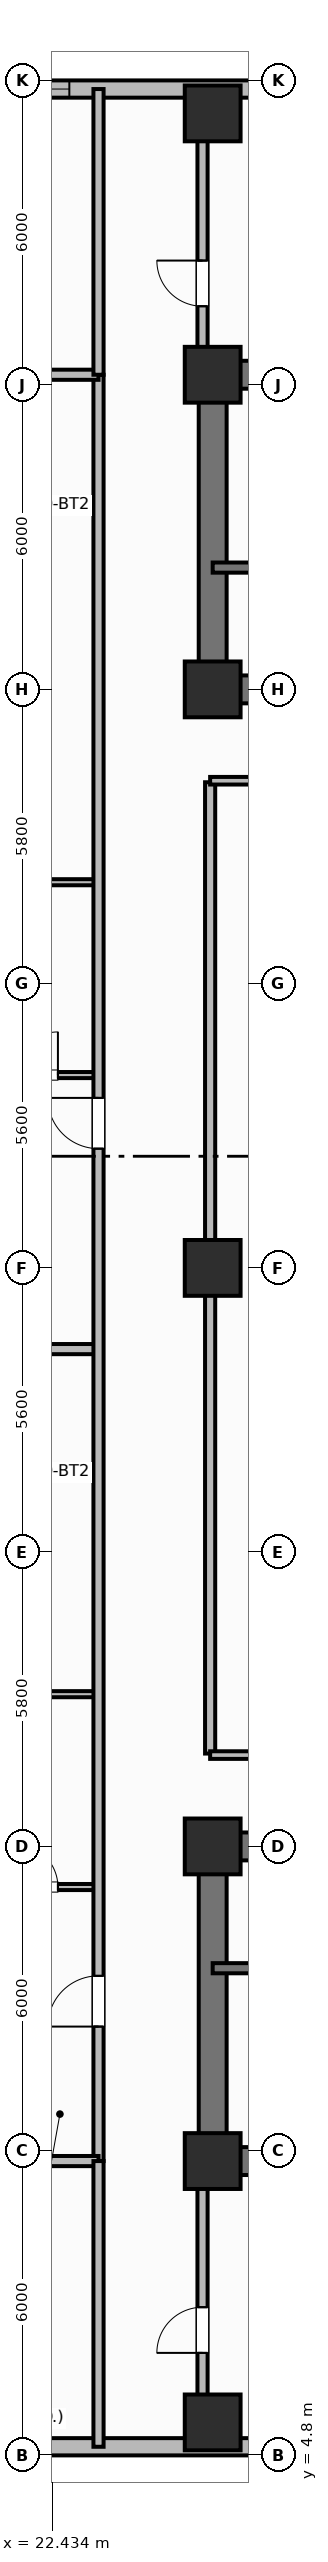
"""IFC4 building model, lengths in metres.
Left out: names, types, materials, properties, quantities, classifications, styles, units other than length and angle.
Written with IfcOpenShell. Run it as: python <this file> out.ifc"""

import sys

from ifc_helpers import new_model, si_unit, direction, frame, frame_2d, origin, origin_2d, place, context, subcontext, project, spatial, rectangle, extrude, element, fill, save


model = new_model("IFC4")
c1 = context("Model", 3, precision=1e-05, world=origin(), true_north=direction((0.0, 1.0)))
c2 = subcontext(c1, "Body", "Model", "MODEL_VIEW")
j1 = project(units=[si_unit("LENGTHUNIT", "METRE"), si_unit("PLANEANGLEUNIT", "RADIAN")], contexts=[c1])
p1 = place(None, origin())
s1 = spatial("IfcSite", under=j1, at=p1, CompositionType="ELEMENT")
p2 = place(p1, origin())
s2 = spatial("IfcBuilding", under=s1, at=p2, CompositionType="ELEMENT")
p3 = place(p2, frame((0.0, 0.0, 121.6)))
s3 = spatial("IfcBuildingStorey", under=s2, at=p3, CompositionType="ELEMENT", Elevation=121.6)
p4 = place(p3, frame((52.8, 10.6, 0.0), z_axis=(0.0, 0.0, 1.0), x_axis=(-1.0, 0.0, 0.0)))
e1 = element("IfcWall", 1, at=p4, inside=s3, PredefinedType="SHEAR", context=c2, shape_type="SweptSolid", body=[
    extrude(rectangle(XDim=27.2, YDim=0.55, at=frame_2d((13.6, 0.0))), origin(), (0.0, 0.0, 1.0), 3.7),
])
p5 = place(p3, frame((25.6, 10.875, 0.0), z_axis=(0.0, 0.0, 1.0), x_axis=(0.0, 1.0, 0.0)))
e2 = element("IfcWall", 2, at=p5, inside=s3, PredefinedType="SHEAR", context=c2, shape_type="SweptSolid", body=[
    extrude(rectangle(XDim=5.65, YDim=0.55, at=frame_2d((2.825, 0.0))), origin(), (0.0, 0.0, 1.0), 3.7),
])
p6 = place(p3, frame((25.6, 16.8, 0.0), z_axis=(0.0, 0.0, 1.0), x_axis=(1.0, 0.0, 0.0)))
e3 = element("IfcWall", 3, at=p6, inside=s3, PredefinedType="SHEAR", context=c2, shape_type="SweptSolid", body=[
    extrude(rectangle(XDim=27.2, YDim=0.55, at=frame_2d((13.6, 0.0))), origin(), (0.0, 0.0, 1.0), 3.7),
])
p7 = place(p6, frame((1.9, 0.0, 0.0)))
e4 = element("IfcOpeningElement", 4, at=p7, cuts=e3, PredefinedType="OPENING", context=c2, shape_type="SweptSolid", body=[
    extrude(rectangle(XDim=1.1, YDim=2.15, at=frame_2d((0.55, 1.075))), frame((0.0, 0.285, 0.0), z_axis=(0.0, -1.0, 0.0), x_axis=(1.0, 0.0, 0.0)), (0.0, 0.0, 1.0), 0.57),
])
p8 = place(p6, frame((13.0, 0.0, 0.0)))
e5 = element("IfcOpeningElement", 5, at=p8, cuts=e3, PredefinedType="OPENING", context=c2, shape_type="SweptSolid", body=[
    extrude(rectangle(XDim=1.2, YDim=2.15, at=frame_2d((0.6, 1.075))), frame((0.0, 0.285, 0.0), z_axis=(0.0, -1.0, 0.0), x_axis=(1.0, 0.0, 0.0)), (0.0, 0.0, 1.0), 0.57),
])
p9 = place(p6, frame((21.6, 0.0, 0.0)))
e6 = element("IfcOpeningElement", 6, at=p9, cuts=e3, PredefinedType="OPENING", context=c2, shape_type="SweptSolid", body=[
    extrude(rectangle(XDim=1.0, YDim=2.15, at=frame_2d((0.5, 1.075))), frame((0.0, 0.285, 0.0), z_axis=(0.0, -1.0, 0.0), x_axis=(1.0, 0.0, 0.0)), (0.0, 0.0, 1.0), 0.57),
])
p10 = place(p3, frame((25.6, 45.8, 0.0), z_axis=(0.0, 0.0, 1.0), x_axis=(1.0, 0.0, 0.0)))
e7 = element("IfcWall", 7, at=p10, inside=s3, PredefinedType="SHEAR", context=c2, shape_type="SweptSolid", body=[
    extrude(rectangle(XDim=27.2, YDim=0.55, at=frame_2d((13.6, 0.0))), origin(), (0.0, 0.0, 1.0), 3.7),
])
p11 = place(p3, frame((25.6, 39.875, 0.0), z_axis=(0.0, 0.0, 1.0), x_axis=(0.0, 1.0, 0.0)))
e8 = element("IfcWall", 8, at=p11, inside=s3, PredefinedType="SHEAR", context=c2, shape_type="SweptSolid", body=[
    extrude(rectangle(XDim=5.65, YDim=0.55, at=frame_2d((2.825, 0.0))), origin(), (0.0, 0.0, 1.0), 3.7),
])
p12 = place(p3, frame((52.8, 39.6, 0.0), z_axis=(0.0, 0.0, 1.0), x_axis=(-1.0, 0.0, 0.0)))
e9 = element("IfcWall", 9, at=p12, inside=s3, PredefinedType="SHEAR", context=c2, shape_type="SweptSolid", body=[
    extrude(rectangle(XDim=27.2, YDim=0.55, at=frame_2d((13.6, 0.0))), origin(), (0.0, 0.0, 1.0), 3.7),
])
p13 = place(p12, frame((24.2, 0.0, 0.0)))
e10 = element("IfcOpeningElement", 10, at=p13, cuts=e9, PredefinedType="OPENING", context=c2, shape_type="SweptSolid", body=[
    extrude(rectangle(XDim=1.1, YDim=2.15, at=frame_2d((0.55, 1.075))), frame((0.0, 0.285, 0.0), z_axis=(0.0, -1.0, 0.0), x_axis=(1.0, 0.0, 0.0)), (0.0, 0.0, 1.0), 0.57),
])
p14 = place(p12, frame((15.1, 0.0, 0.0)))
e11 = element("IfcOpeningElement", 11, at=p14, cuts=e9, PredefinedType="OPENING", context=c2, shape_type="SweptSolid", body=[
    extrude(rectangle(XDim=1.2, YDim=2.15, at=frame_2d((0.6, 1.075))), frame((0.0, 0.285, 0.0), z_axis=(0.0, -1.0, 0.0), x_axis=(1.0, 0.0, 0.0)), (0.0, 0.0, 1.0), 0.57),
])
p15 = place(p12, frame((11.3, 0.0, 0.0)))
e12 = element("IfcOpeningElement", 12, at=p15, cuts=e9, PredefinedType="OPENING", context=c2, shape_type="SweptSolid", body=[
    extrude(rectangle(XDim=1.3, YDim=2.2, at=frame_2d((0.65, 1.1))), frame((0.0, 0.285, 0.0), z_axis=(0.0, -1.0, 0.0), x_axis=(1.0, 0.0, 0.0)), (0.0, 0.0, 1.0), 0.57),
])
p16 = place(p12, frame((7.25, 0.0, 0.0)))
e13 = element("IfcOpeningElement", 13, at=p16, cuts=e9, PredefinedType="OPENING", context=c2, shape_type="SweptSolid", body=[
    extrude(rectangle(XDim=0.85, YDim=2.1, at=frame_2d((0.425, 1.05))), frame((0.0, 0.285, 0.0), z_axis=(0.0, -1.0, 0.0), x_axis=(1.0, 0.0, 0.0)), (0.0, 0.0, 1.0), 0.57),
])
p17 = place(p12, frame((3.0, 0.0, 0.0)))
e14 = element("IfcOpeningElement", 14, at=p17, cuts=e9, PredefinedType="OPENING", context=c2, shape_type="SweptSolid", body=[
    extrude(rectangle(XDim=0.9, YDim=2.1, at=frame_2d((0.45, 1.05))), frame((0.0, 0.285, 0.0), z_axis=(0.0, -1.0, 0.0), x_axis=(1.0, 0.0, 0.0)), (0.0, 0.0, 1.0), 0.57),
])
for number, where, z_axis, x_axis in (
    (15, (25.6, 10.6, 0.0), (0.0, 0.0, 1.0), (1.0, 0.0, 0.0)),
    (16, (25.6, 16.8, 0.0), (0.0, 0.0, 1.0), (1.0, 0.0, 0.0)),
    (17, (25.6, 39.6, 0.0), (0.0, 0.0, 1.0), (1.0, 0.0, 0.0)),
    (18, (25.6, 45.8, 0.0), (0.0, 0.0, 1.0), (1.0, 0.0, 0.0)),
    (19, (25.6, 28.2, 0.0), (0.0, 0.0, 1.0), (1.0, 0.0, 0.0)),
    (20, (25.6, 5.45, 0.0), (0.0, 0.0, 1.0), (1.0, 0.0, 0.0)),
    (21, (25.6, 50.95, 0.0), (0.0, 0.0, 1.0), (1.0, 0.0, 0.0)),
):
    element("IfcColumn", number, at=place(p3, frame(where, z_axis=z_axis, x_axis=x_axis)), inside=s3, PredefinedType="COLUMN", context=c2, shape_type="SweptSolid", body=[
        extrude(rectangle(XDim=1.1, YDim=1.1, at=origin_2d()), origin(), (0.0, 0.0, 1.0), 3.7),
    ])
p18 = place(p3, frame((18.6, 4.97, 0.0), z_axis=(0.0, 0.0, 1.0), x_axis=(1.0, 0.0, 0.0)))
e22 = element("IfcWall", 22, at=p18, inside=s3, PredefinedType="SOLIDWALL", context=c2, shape_type="SweptSolid", body=[
    extrude(rectangle(XDim=17.4, YDim=0.34, at=frame_2d((8.7, 0.0))), origin(), (0.0, 0.0, 1.0), 2.7),
])
p19 = place(p18, frame((1.762, 0.0, 0.73)))
e23 = element("IfcOpeningElement", 23, at=p19, cuts=e22, PredefinedType="OPENING", context=c2, shape_type="SweptSolid", body=[
    extrude(rectangle(XDim=1.8, YDim=1.85, at=frame_2d((0.9, 0.925))), frame((0.0, 0.18, 0.0), z_axis=(0.0, -1.0, 0.0), x_axis=(1.0, 0.0, 0.0)), (0.0, 0.0, 1.0), 0.36),
])
p20 = place(p18, frame((9.812, 0.0, 0.73)))
e24 = element("IfcOpeningElement", 24, at=p20, cuts=e22, PredefinedType="OPENING", context=c2, shape_type="SweptSolid", body=[
    extrude(rectangle(XDim=1.8, YDim=1.85, at=frame_2d((0.9, 0.925))), frame((0.0, 0.18, 0.0), z_axis=(0.0, -1.0, 0.0), x_axis=(1.0, 0.0, 0.0)), (0.0, 0.0, 1.0), 0.36),
])
p21 = place(p18, frame((13.488, 0.0, 0.73)))
e25 = element("IfcOpeningElement", 25, at=p21, cuts=e22, PredefinedType="OPENING", context=c2, shape_type="SweptSolid", body=[
    extrude(rectangle(XDim=1.8, YDim=1.85, at=frame_2d((0.9, 0.925))), frame((0.0, 0.18, 0.0), z_axis=(0.0, -1.0, 0.0), x_axis=(1.0, 0.0, 0.0)), (0.0, 0.0, 1.0), 0.36),
])
p22 = place(p3, frame((36.0, 51.43, 0.0), z_axis=(0.0, 0.0, 1.0), x_axis=(-1.0, 0.0, 0.0)))
e26 = element("IfcWall", 26, at=p22, inside=s3, PredefinedType="SOLIDWALL", context=c2, shape_type="SweptSolid", body=[
    extrude(rectangle(XDim=17.4, YDim=0.34, at=frame_2d((8.7, 0.0))), origin(), (0.0, 0.0, 1.0), 2.7),
])
p23 = place(p22, frame((4.125, 0.0, 0.93)))
e27 = element("IfcOpeningElement", 27, at=p23, cuts=e26, PredefinedType="OPENING", context=c2, shape_type="SweptSolid", body=[
    extrude(rectangle(XDim=1.1, YDim=1.65, at=frame_2d((0.55, 0.825))), frame((0.0, 0.18, 0.0), z_axis=(0.0, -1.0, 0.0), x_axis=(1.0, 0.0, 0.0)), (0.0, 0.0, 1.0), 0.36),
])
p24 = place(p22, frame((6.808, 0.0, 0.93)))
e28 = element("IfcOpeningElement", 28, at=p24, cuts=e26, PredefinedType="OPENING", context=c2, shape_type="SweptSolid", body=[
    extrude(rectangle(XDim=1.1, YDim=1.65, at=frame_2d((0.55, 0.825))), frame((0.0, 0.18, 0.0), z_axis=(0.0, -1.0, 0.0), x_axis=(1.0, 0.0, 0.0)), (0.0, 0.0, 1.0), 0.36),
])
p25 = place(p22, frame((13.225, 0.0, 0.93)))
e29 = element("IfcOpeningElement", 29, at=p25, cuts=e26, PredefinedType="OPENING", context=c2, shape_type="SweptSolid", body=[
    extrude(rectangle(XDim=1.1, YDim=1.65, at=frame_2d((0.55, 0.825))), frame((0.0, 0.18, 0.0), z_axis=(0.0, -1.0, 0.0), x_axis=(1.0, 0.0, 0.0)), (0.0, 0.0, 1.0), 0.36),
])
p26 = place(p22, frame((14.858, 0.0, 0.93)))
e30 = element("IfcOpeningElement", 30, at=p26, cuts=e26, PredefinedType="OPENING", context=c2, shape_type="SweptSolid", body=[
    extrude(rectangle(XDim=1.1, YDim=1.65, at=frame_2d((0.55, 0.825))), frame((0.0, 0.18, 0.0), z_axis=(0.0, -1.0, 0.0), x_axis=(1.0, 0.0, 0.0)), (0.0, 0.0, 1.0), 0.36),
])
p27 = place(p3, frame((25.6, 14.4, 0.0), z_axis=(0.0, 0.0, 1.0), x_axis=(1.0, 0.0, 0.0)))
e31 = element("IfcWall", 31, at=p27, inside=s3, PredefinedType="SHEAR", context=c2, shape_type="SweptSolid", body=[
    extrude(rectangle(XDim=9.55, YDim=0.2, at=frame_2d((4.775, 0.0))), origin(), (0.0, 0.0, 1.0), 3.7),
])
p28 = place(p27, frame((1.05, 0.0, 0.0)))
e32 = element("IfcOpeningElement", 32, at=p28, cuts=e31, PredefinedType="OPENING", context=c2, shape_type="SweptSolid", body=[
    extrude(rectangle(XDim=1.1, YDim=2.15, at=frame_2d((0.55, 1.075))), frame((0.0, 0.11, 0.0), z_axis=(0.0, -1.0, 0.0), x_axis=(1.0, 0.0, 0.0)), (0.0, 0.0, 1.0), 0.22),
])
p29 = place(p3, frame((35.15, 42.0, 0.0), z_axis=(0.0, 0.0, 1.0), x_axis=(-1.0, 0.0, 0.0)))
e33 = element("IfcWall", 33, at=p29, inside=s3, PredefinedType="SHEAR", context=c2, shape_type="SweptSolid", body=[
    extrude(rectangle(XDim=9.55, YDim=0.2, at=frame_2d((4.775, 0.0))), origin(), (0.0, 0.0, 1.0), 3.7),
])
p30 = place(p29, frame((7.25, 0.0, 0.0)))
e34 = element("IfcOpeningElement", 34, at=p30, cuts=e33, PredefinedType="OPENING", context=c2, shape_type="SweptSolid", body=[
    extrude(rectangle(XDim=1.1, YDim=2.15, at=frame_2d((0.55, 1.075))), frame((0.0, 0.11, 0.0), z_axis=(0.0, -1.0, 0.0), x_axis=(1.0, 0.0, 0.0)), (0.0, 0.0, 1.0), 0.22),
])
p31 = place(p3, frame((25.55, 18.63, 0.0), z_axis=(0.0, 0.0, 1.0), x_axis=(0.0, 1.0, 0.0)))
e35 = element("IfcWall", 35, at=p31, inside=s3, PredefinedType="PARTITIONING", context=c2, shape_type="SweptSolid", body=[
    extrude(rectangle(XDim=19.14, YDim=0.2, at=frame_2d((9.57, 0.0))), origin(), (0.0, 0.0, 1.0), 2.53),
])
for number, where, z_axis, x_axis in (
    (36, (25.55, 18.6, 0.0), (0.0, 0.0, 1.0), (1.0, 0.0, 0.0)),
    (37, (25.55, 37.8, 0.0), (0.0, 0.0, 1.0), (1.0, 0.0, 0.0)),
):
    element("IfcWall", number, at=place(p3, frame(where, z_axis=z_axis, x_axis=x_axis)), inside=s3, PredefinedType="PARTITIONING", context=c2, shape_type="SweptSolid", body=[
        extrude(rectangle(XDim=6.5, YDim=0.15, at=frame_2d((3.25, 0.0))), origin(), (0.0, 0.0, 1.0), 2.53),
    ])
p32 = place(p3, frame((21.1, 16.0, 0.0), z_axis=(0.0, 0.0, 1.0), x_axis=(1.0, 0.0, 0.0)))
e38 = element("IfcWall", 38, at=p32, inside=s3, PredefinedType="PARTITIONING", context=c2, shape_type="SweptSolid", body=[
    extrude(rectangle(XDim=2.25, YDim=0.12, at=frame_2d((1.125, 0.0))), origin(), (0.0, 0.0, 1.0), 2.53),
])
p33 = place(p32, frame((0.6, 0.0, 0.0)))
e39 = element("IfcOpeningElement", 39, at=p33, cuts=e38, PredefinedType="OPENING", context=c2, shape_type="SweptSolid", body=[
    extrude(rectangle(XDim=0.85, YDim=2.1, at=frame_2d((0.425, 1.05))), frame((0.0, 0.07, 0.0), z_axis=(0.0, -1.0, 0.0), x_axis=(1.0, 0.0, 0.0)), (0.0, 0.0, 1.0), 0.14),
])
p34 = place(p3, frame((21.1, 19.8, 0.0), z_axis=(0.0, 0.0, 1.0), x_axis=(1.0, 0.0, 0.0)))
e40 = element("IfcWall", 40, at=p34, inside=s3, PredefinedType="PARTITIONING", context=c2, shape_type="SweptSolid", body=[
    extrude(rectangle(XDim=2.25, YDim=0.12, at=frame_2d((1.125, 0.0))), origin(), (0.0, 0.0, 1.0), 2.53),
])
p35 = place(p3, frame((14.999, 26.6, 0.0), z_axis=(0.0, 0.0, 1.0), x_axis=(1.0, 0.0, 0.0)))
e41 = element("IfcWall", 41, at=p35, inside=s3, PredefinedType="PARTITIONING", context=c2, shape_type="SweptSolid", body=[
    extrude(rectangle(XDim=8.352, YDim=0.2, at=frame_2d((4.176, 0.0))), origin(), (0.0, 0.0, 1.0), 2.53),
])
p36 = place(p3, frame((21.1, 32.0, 0.0), z_axis=(0.0, 0.0, 1.0), x_axis=(1.0, 0.0, 0.0)))
e42 = element("IfcWall", 42, at=p36, inside=s3, PredefinedType="PARTITIONING", context=c2, shape_type="SweptSolid", body=[
    extrude(rectangle(XDim=2.25, YDim=0.12, at=frame_2d((1.125, 0.0))), origin(), (0.0, 0.0, 1.0), 2.53),
])
p37 = place(p36, frame((0.6, 0.0, 0.0)))
e43 = element("IfcOpeningElement", 43, at=p37, cuts=e42, PredefinedType="OPENING", context=c2, shape_type="SweptSolid", body=[
    extrude(rectangle(XDim=0.85, YDim=2.1, at=frame_2d((0.425, 1.05))), frame((0.0, 0.07, 0.0), z_axis=(0.0, -1.0, 0.0), x_axis=(1.0, 0.0, 0.0)), (0.0, 0.0, 1.0), 0.14),
])
p38 = place(p3, frame((21.1, 35.8, 0.0), z_axis=(0.0, 0.0, 1.0), x_axis=(1.0, 0.0, 0.0)))
e44 = element("IfcWall", 44, at=p38, inside=s3, PredefinedType="PARTITIONING", context=c2, shape_type="SweptSolid", body=[
    extrude(rectangle(XDim=2.25, YDim=0.12, at=frame_2d((1.125, 0.0))), origin(), (0.0, 0.0, 1.0), 2.53),
])
p39 = place(p3, frame((23.35, 10.6, 0.0), z_axis=(0.0, 0.0, 1.0), x_axis=(0.0, 1.0, 0.0)))
e45 = element("IfcWall", 45, at=p39, inside=s3, PredefinedType="PARTITIONING", context=c2, shape_type="SweptSolid", body=[
    extrude(rectangle(XDim=35.2, YDim=0.2, at=frame_2d((17.6, 0.0))), origin(), (0.0, 0.0, 1.0), 2.53),
])
p40 = place(p39, frame((2.65, 0.0, 0.0)))
e46 = element("IfcOpeningElement", 46, at=p40, cuts=e45, PredefinedType="OPENING", context=c2, shape_type="SweptSolid", body=[
    extrude(rectangle(XDim=1.0, YDim=2.15, at=frame_2d((0.5, 1.075))), frame((0.0, 0.11, 0.0), z_axis=(0.0, -1.0, 0.0), x_axis=(1.0, 0.0, 0.0)), (0.0, 0.0, 1.0), 0.22),
])
p41 = place(p39, frame((19.95, 0.0, 0.0)))
e47 = element("IfcOpeningElement", 47, at=p41, cuts=e45, PredefinedType="OPENING", context=c2, shape_type="SweptSolid", body=[
    extrude(rectangle(XDim=1.0, YDim=2.15, at=frame_2d((0.5, 1.075))), frame((0.0, 0.11, 0.0), z_axis=(0.0, -1.0, 0.0), x_axis=(1.0, 0.0, 0.0)), (0.0, 0.0, 1.0), 0.22),
])
for number, where, z_axis, x_axis in (
    (48, (14.99, 10.6, 0.0), (0.0, 0.0, 1.0), (1.0, 0.0, 0.0)),
    (49, (14.99, 45.8, 0.0), (0.0, 0.0, 1.0), (1.0, 0.0, 0.0)),
):
    element("IfcWall", number, at=place(p3, frame(where, z_axis=z_axis, x_axis=x_axis)), inside=s3, PredefinedType="PARTITIONING", context=c2, shape_type="SweptSolid", body=[
        extrude(rectangle(XDim=8.36, YDim=0.2, at=frame_2d((4.18, 0.0))), origin(), (0.0, 0.0, 1.0), 2.53),
    ])
p42 = place(p3, frame((23.35, 4.97, 0.0), z_axis=(0.0, 0.0, 1.0), x_axis=(0.0, 1.0, 0.0)))
e50 = element("IfcWall", 50, at=p42, inside=s3, PredefinedType="PARTITIONING", context=c2, shape_type="SweptSolid", body=[
    extrude(rectangle(XDim=5.63, YDim=0.2, at=frame_2d((2.815, 0.0))), origin(), (0.0, 0.0, 1.0), 2.53),
])
p43 = place(p3, frame((23.35, 45.8, 0.0), z_axis=(0.0, 0.0, 1.0), x_axis=(0.0, 1.0, 0.0)))
e51 = element("IfcWall", 51, at=p43, inside=s3, PredefinedType="PARTITIONING", context=c2, shape_type="SweptSolid", body=[
    extrude(rectangle(XDim=5.63, YDim=0.2, at=frame_2d((2.815, 0.0))), origin(), (0.0, 0.0, 1.0), 2.53),
])
p44 = place(p3, frame((25.4, 5.77, 0.0), z_axis=(0.0, 0.0, 1.0), x_axis=(0.0, 1.0, 0.0)))
e52 = element("IfcWall", 52, at=p44, inside=s3, PredefinedType="PARTITIONING", context=c2, shape_type="SweptSolid", body=[
    extrude(rectangle(XDim=4.53, YDim=0.2, at=frame_2d((2.265, 0.0))), origin(), (0.0, 0.0, 1.0), 2.53),
])
p45 = place(p44, frame((1.05, 0.0, 0.0)))
e53 = element("IfcOpeningElement", 53, at=p45, cuts=e52, PredefinedType="OPENING", context=c2, shape_type="SweptSolid", body=[
    extrude(rectangle(XDim=0.9, YDim=2.1, at=frame_2d((0.45, 1.05))), frame((0.0, 0.11, 0.0), z_axis=(0.0, -1.0, 0.0), x_axis=(1.0, 0.0, 0.0)), (0.0, 0.0, 1.0), 0.22),
])
p46 = place(p3, frame((25.4, 46.1, 0.0), z_axis=(0.0, 0.0, 1.0), x_axis=(0.0, 1.0, 0.0)))
e54 = element("IfcWall", 54, at=p46, inside=s3, PredefinedType="PARTITIONING", context=c2, shape_type="SweptSolid", body=[
    extrude(rectangle(XDim=4.53, YDim=0.2, at=frame_2d((2.265, 0.0))), origin(), (0.0, 0.0, 1.0), 2.53),
])
p47 = place(p46, frame((1.05, 0.0, 0.0)))
e55 = element("IfcOpeningElement", 55, at=p47, cuts=e54, PredefinedType="OPENING", context=c2, shape_type="SweptSolid", body=[
    extrude(rectangle(XDim=0.9, YDim=2.1, at=frame_2d((0.45, 1.05))), frame((0.0, 0.11, 0.0), z_axis=(0.0, -1.0, 0.0), x_axis=(1.0, 0.0, 0.0)), (0.0, 0.0, 1.0), 0.22),
])
p48 = place(p25, origin())
e56 = element("IfcWindow", 56, at=p48, inside=s3, PartitioningType="SINGLE_PANEL", PredefinedType="WINDOW", context=c2, shape_type="SweptSolid", body=[
    extrude(rectangle(XDim=1.1, YDim=1.65, at=frame_2d((0.55, 0.825))), frame((0.0, 0.03, 0.0), z_axis=(0.0, -1.0, 0.0), x_axis=(1.0, 0.0, 0.0)), (0.0, 0.0, 1.0), 0.06),
])
fill(e29, e56)
p49 = place(p33, origin())
e57 = element("IfcDoor", 57, at=p49, inside=s3, OperationType="SINGLE_SWING_LEFT", PredefinedType="DOOR", context=c2, shape_type="SweptSolid", body=[
    extrude(rectangle(XDim=0.85, YDim=2.1, at=frame_2d((0.425, 1.05))), frame((0.0, 0.025, 0.0), z_axis=(0.0, -1.0, 0.0), x_axis=(1.0, 0.0, 0.0)), (0.0, 0.0, 1.0), 0.05),
])
fill(e39, e57)
p50 = place(p37, origin())
e58 = element("IfcDoor", 58, at=p50, inside=s3, OperationType="SINGLE_SWING_RIGHT", PredefinedType="DOOR", context=c2, shape_type="SweptSolid", body=[
    extrude(rectangle(XDim=0.85, YDim=2.1, at=frame_2d((0.425, 1.05))), frame((0.0, 0.025, 0.0), z_axis=(0.0, -1.0, 0.0), x_axis=(1.0, 0.0, 0.0)), (0.0, 0.0, 1.0), 0.05),
])
fill(e43, e58)
p51 = place(p40, origin())
e59 = element("IfcDoor", 59, at=p51, inside=s3, OperationType="SINGLE_SWING_LEFT", PredefinedType="DOOR", context=c2, shape_type="SweptSolid", body=[
    extrude(rectangle(XDim=1.0, YDim=2.15, at=frame_2d((0.5, 1.075))), frame((0.0, 0.025, 0.0), z_axis=(0.0, -1.0, 0.0), x_axis=(1.0, 0.0, 0.0)), (0.0, 0.0, 1.0), 0.05),
])
fill(e46, e59)
p52 = place(p41, origin())
e60 = element("IfcDoor", 60, at=p52, inside=s3, OperationType="SINGLE_SWING_RIGHT", PredefinedType="DOOR", context=c2, shape_type="SweptSolid", body=[
    extrude(rectangle(XDim=1.0, YDim=2.15, at=frame_2d((0.5, 1.075))), frame((0.0, 0.025, 0.0), z_axis=(0.0, -1.0, 0.0), x_axis=(1.0, 0.0, 0.0)), (0.0, 0.0, 1.0), 0.05),
])
fill(e47, e60)
p53 = place(p45, origin())
e61 = element("IfcDoor", 61, at=p53, inside=s3, OperationType="SINGLE_SWING_LEFT", PredefinedType="DOOR", context=c2, shape_type="SweptSolid", body=[
    extrude(rectangle(XDim=0.9, YDim=2.1, at=frame_2d((0.45, 1.05))), frame((0.0, 0.025, 0.0), z_axis=(0.0, -1.0, 0.0), x_axis=(1.0, 0.0, 0.0)), (0.0, 0.0, 1.0), 0.05),
])
fill(e53, e61)
p54 = place(p47, origin())
e62 = element("IfcDoor", 62, at=p54, inside=s3, OperationType="SINGLE_SWING_RIGHT", PredefinedType="DOOR", context=c2, shape_type="SweptSolid", body=[
    extrude(rectangle(XDim=0.9, YDim=2.1, at=frame_2d((0.45, 1.05))), frame((0.0, 0.025, 0.0), z_axis=(0.0, -1.0, 0.0), x_axis=(1.0, 0.0, 0.0)), (0.0, 0.0, 1.0), 0.05),
])
fill(e55, e62)
save(model, sys.argv[1])
